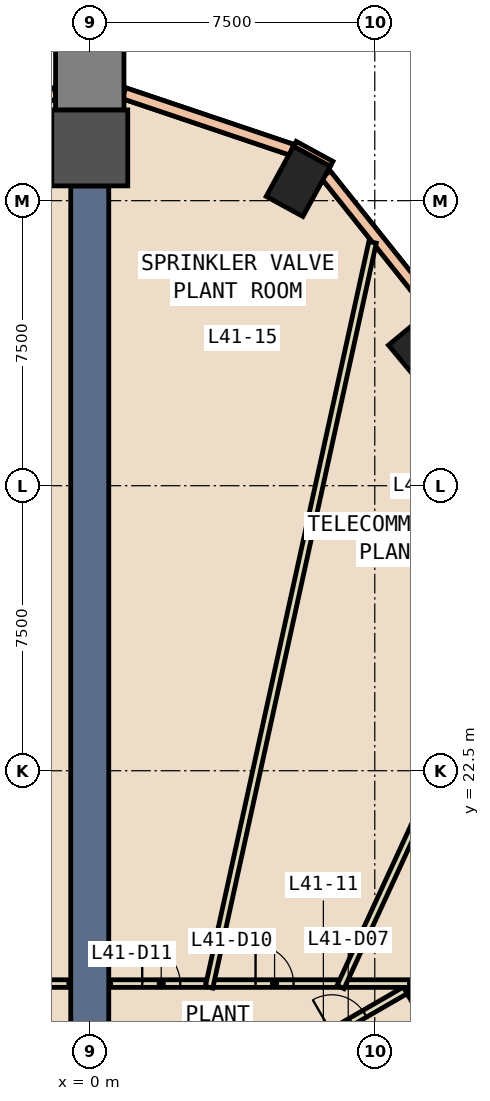
"""IFC4 building model, lengths in metres.
Left out: names, types, materials, properties, quantities, classifications, styles, units other than length and angle.
Written with IfcOpenShell. Run it as: python <this file> out.ifc"""

import sys

from ifc_helpers import new_model, si_unit, direction, frame, frame_2d, origin, origin_2d, place, context, subcontext, project, spatial, rectangle, extrude, element, fill, save


model = new_model("IFC4")
c1 = context("Model", 3, precision=1e-05, world=origin(), true_north=direction((0.0, 1.0)))
c2 = subcontext(c1, "Body", "Model", "MODEL_VIEW")
j1 = project(units=[si_unit("LENGTHUNIT", "METRE"), si_unit("PLANEANGLEUNIT", "RADIAN")], contexts=[c1])
p1 = place(None, origin())
s1 = spatial("IfcSite", under=j1, at=p1, CompositionType="ELEMENT")
p2 = place(p1, origin())
s2 = spatial("IfcBuilding", under=s1, at=p2, CompositionType="ELEMENT")
p3 = place(p2, frame((0.0, 0.0, 184.4)))
s3 = spatial("IfcBuildingStorey", under=s2, at=p3, CompositionType="ELEMENT", Elevation=184.4)
for number, where, z_axis, x_axis in (
    (1, (8.789, 33.754, -0.6), (0.0, 0.0, 1.0), (-0.639, 0.769, 0.0)),
    (2, (5.485, 38.006, -0.6), (0.0, 0.0, 1.0), (-0.878, 0.479, 0.0)),
):
    element("IfcColumn", number, at=place(p3, frame(where, z_axis=z_axis, x_axis=x_axis)), inside=s3, PredefinedType="COLUMN", context=c2, shape_type="SweptSolid", body=[
        extrude(rectangle(XDim=1.1, YDim=1.5, at=origin_2d()), origin(), (0.0, 0.0, 1.0), 5.4),
    ])
p4 = place(p3, frame((0.0, 38.889, -0.6), z_axis=(0.0, 0.0, 1.0), x_axis=(0.0, 1.0, 0.0)))
e3 = element("IfcColumn", 3, at=p4, inside=s3, PredefinedType="COLUMN", context=c2, shape_type="SweptSolid", body=[
    extrude(rectangle(XDim=2.0, YDim=2.0, at=origin_2d()), origin(), (0.0, 0.0, 1.0), 5.4),
])
p5 = place(p3, frame((0.0, 40.789, -0.6), z_axis=(0.0, 0.0, 1.0), x_axis=(0.0, 1.0, 0.0)))
e4 = element("IfcColumn", 4, at=p5, inside=s3, PredefinedType="COLUMN", context=c2, shape_type="SweptSolid", body=[
    extrude(rectangle(XDim=1.8, YDim=1.8, at=origin_2d()), origin(), (0.0, 0.0, 1.0), 5.4),
])
p6 = place(p3, frame((0.0, 14.5, 0.0), z_axis=(0.0, 0.0, 1.0), x_axis=(0.0, 1.0, 0.0)))
e5 = element("IfcWall", 5, at=p6, inside=s3, PredefinedType="SHEAR", context=c2, shape_type="SweptSolid", body=[
    extrude(rectangle(XDim=23.389, YDim=1.0, at=frame_2d((11.694, 0.0))), origin(), (0.0, 0.0, 1.0), 4.8),
])
p7 = place(p3, frame((6.363, 38.467, 0.0), z_axis=(0.0, 0.0, 1.0), x_axis=(-0.877929486755, 0.478789950068, 0.0)))
e6 = element("IfcWall", 6, at=p7, inside=s3, PredefinedType="STANDARD", context=c2, shape_type="SweptSolid", body=[
    extrude(rectangle(XDim=1.1, YDim=0.15, at=frame_2d((0.55, 0.0))), origin(), (0.0, 0.0, 1.0), 4.8),
])
p8 = place(p3, frame((9.023, 34.662, 0.0), z_axis=(0.0, 0.0, 1.0), x_axis=(-0.623651555058, 0.781702461218, 0.0)))
e7 = element("IfcWall", 7, at=p8, inside=s3, PredefinedType="STANDARD", context=c2, shape_type="SweptSolid", body=[
    extrude(rectangle(XDim=4.51, YDim=0.3, at=frame_2d((2.255, 0.0))), origin(), (0.0, 0.0, 1.0), 1.2),
])
p9 = place(p3, frame((9.023, 34.662, 4.0), z_axis=(0.0, 0.0, 1.0), x_axis=(-0.623651555058, 0.781702461218, 0.0)))
e8 = element("IfcWall", 8, at=p9, inside=s3, PredefinedType="STANDARD", context=c2, shape_type="SweptSolid", body=[
    extrude(rectangle(XDim=4.51, YDim=0.3, at=frame_2d((2.255, 0.0))), origin(), (0.0, 0.0, 1.0), 0.8),
])
p10 = place(p3, frame((5.315, 38.84, 0.0), z_axis=(0.0, 0.0, 1.0), x_axis=(-0.947661997786, 0.319275332514, 0.0)))
e9 = element("IfcWall", 9, at=p10, inside=s3, PredefinedType="STANDARD", context=c2, shape_type="SweptSolid", body=[
    extrude(rectangle(XDim=4.66, YDim=0.3, at=frame_2d((2.33, 0.0))), origin(), (0.0, 0.0, 1.0), 1.2),
])
p11 = place(p3, frame((5.315, 38.84, 4.0), z_axis=(0.0, 0.0, 1.0), x_axis=(-0.947661997786, 0.319275332514, 0.0)))
e10 = element("IfcWall", 10, at=p11, inside=s3, PredefinedType="STANDARD", context=c2, shape_type="SweptSolid", body=[
    extrude(rectangle(XDim=4.66, YDim=0.3, at=frame_2d((2.33, 0.0))), origin(), (0.0, 0.0, 1.0), 0.8),
])
p12 = place(p3, frame((-0.899, 40.328, 0.0), z_axis=(0.0, 0.0, 1.0), x_axis=(-0.947661997786, -0.319275332514, 0.0)))
e11 = element("IfcWall", 11, at=p12, inside=s3, PredefinedType="STANDARD", context=c2, shape_type="SweptSolid", body=[
    extrude(rectangle(XDim=4.66, YDim=0.3, at=frame_2d((2.33, 0.0))), origin(), (0.0, 0.0, 1.0), 1.2),
])
p13 = place(p3, frame((-0.899, 40.328, 4.0), z_axis=(0.0, 0.0, 1.0), x_axis=(-0.947661997786, -0.319275332514, 0.0)))
e12 = element("IfcWall", 12, at=p13, inside=s3, PredefinedType="STANDARD", context=c2, shape_type="SweptSolid", body=[
    extrude(rectangle(XDim=4.66, YDim=0.3, at=frame_2d((2.33, 0.0))), origin(), (0.0, 0.0, 1.0), 0.8),
])
p14 = place(p3, frame((6.223, 15.521, 0.0), z_axis=(0.0, 0.0, 1.0), x_axis=(0.866022959057, 0.500004234368, 0.0)))
e13 = element("IfcWall", 13, at=p14, inside=s3, PredefinedType="PARTITIONING", context=c2, shape_type="SweptSolid", body=[
    extrude(rectangle(XDim=2.5, YDim=0.2, at=frame_2d((1.25, 0.0))), origin(), (0.0, 0.0, 1.0), 4.8),
])
p15 = place(p14, frame((0.168, 0.0, 0.0)))
e14 = element("IfcOpeningElement", 14, at=p15, cuts=e13, PredefinedType="OPENING", context=c2, shape_type="SweptSolid", body=[
    extrude(rectangle(XDim=1.0, YDim=2.1, at=frame_2d((0.5, 1.05))), frame((0.0, 0.11, 0.0), z_axis=(0.0, -1.0, 0.0), x_axis=(1.0, 0.0, 0.0)), (0.0, 0.0, 1.0), 0.22),
])
p16 = place(p3, frame((8.398, 16.754, 0.0), z_axis=(0.0, 0.0, 1.0), x_axis=(0.500277597875, -0.865865073245, 0.0)))
e15 = element("IfcWall", 15, at=p16, inside=s3, PredefinedType="PARTITIONING", context=c2, shape_type="SweptSolid", body=[
    extrude(rectangle(XDim=0.114, YDim=0.2, at=frame_2d((0.057, 0.0))), origin(), (0.0, 0.0, 1.0), 4.8),
])
p17 = place(p3, frame((6.741, 16.9, 0.0), z_axis=(0.0, 0.0, 1.0), x_axis=(1.0, 0.0, 0.0)))
e16 = element("IfcWall", 16, at=p17, inside=s3, PredefinedType="PARTITIONING", context=c2, shape_type="SweptSolid", body=[
    extrude(rectangle(XDim=1.673, YDim=0.2, at=frame_2d((0.836, 0.0))), origin(), (0.0, 0.0, 1.0), 4.8),
])
p18 = place(p3, frame((3.26, 16.9, 0.0), z_axis=(0.0, 0.0, 1.0), x_axis=(1.0, 0.0, 0.0)))
e17 = element("IfcWall", 17, at=p18, inside=s3, PredefinedType="PARTITIONING", context=c2, shape_type="SweptSolid", body=[
    extrude(rectangle(XDim=3.281, YDim=0.2, at=frame_2d((1.641, 0.0))), origin(), (0.0, 0.0, 1.0), 4.8),
])
p19 = place(p18, frame((1.103, 0.0, 0.0)))
e18 = element("IfcOpeningElement", 18, at=p19, cuts=e17, PredefinedType="OPENING", context=c2, shape_type="SweptSolid", body=[
    extrude(rectangle(XDim=1.0, YDim=2.1, at=frame_2d((0.5, 1.05))), frame((0.0, 0.11, 0.0), z_axis=(0.0, -1.0, 0.0), x_axis=(1.0, 0.0, 0.0)), (0.0, 0.0, 1.0), 0.22),
])
p20 = place(p3, frame((0.55, 16.9, 0.0), z_axis=(0.0, 0.0, 1.0), x_axis=(1.0, 0.0, 0.0)))
e19 = element("IfcWall", 19, at=p20, inside=s3, PredefinedType="PARTITIONING", context=c2, shape_type="SweptSolid", body=[
    extrude(rectangle(XDim=2.51, YDim=0.2, at=frame_2d((1.255, 0.0))), origin(), (0.0, 0.0, 1.0), 4.8),
])
p21 = place(p20, frame((0.83, 0.0, 0.0)))
e20 = element("IfcOpeningElement", 20, at=p21, cuts=e19, PredefinedType="OPENING", context=c2, shape_type="SweptSolid", body=[
    extrude(rectangle(XDim=1.0, YDim=2.1, at=frame_2d((0.5, 1.05))), frame((0.0, 0.11, 0.0), z_axis=(0.0, -1.0, 0.0), x_axis=(1.0, 0.0, 0.0)), (0.0, 0.0, 1.0), 0.22),
])
p22 = place(p3, frame((6.599, 16.809, 0.0), z_axis=(0.0, 0.0, 1.0), x_axis=(0.418744831877, 0.908103939963, 0.0)))
e21 = element("IfcWall", 21, at=p22, inside=s3, PredefinedType="PARTITIONING", context=c2, shape_type="SweptSolid", body=[
    extrude(rectangle(XDim=12.353, YDim=0.2, at=frame_2d((6.177, 0.0))), origin(), (0.0, 0.0, 1.0), 4.8),
])
p23 = place(p3, frame((3.139, 16.802, 0.0), z_axis=(0.0, 0.0, 1.0), x_axis=(0.214411540921, 0.976743411096, 0.0)))
e22 = element("IfcWall", 22, at=p23, inside=s3, PredefinedType="PARTITIONING", context=c2, shape_type="SweptSolid", body=[
    extrude(rectangle(XDim=20.069, YDim=0.2, at=frame_2d((10.034, 0.0))), origin(), (0.0, 0.0, 1.0), 4.8),
])
p24 = place(p3, frame((0.0, 39.909, 0.0), z_axis=(0.0, 0.0, 1.0), x_axis=(0.0, 1.0, 0.0)))
e23 = element("IfcWall", 23, at=p24, inside=s3, PredefinedType="PARTITIONING", context=c2, shape_type="SweptSolid", body=[
    extrude(rectangle(XDim=0.5, YDim=0.2, at=frame_2d((0.25, 0.0))), origin(), (0.0, 0.0, 1.0), 4.8),
])
p25 = place(p3, frame((8.455, 16.655, 0.0), z_axis=(0.0, 0.0, 1.0), x_axis=(0.499968249168, -0.86604373436, 0.0)))
e24 = element("IfcWall", 24, at=p25, inside=s3, PredefinedType="PARTITIONING", context=c2, shape_type="SweptSolid", body=[
    extrude(rectangle(XDim=1.118, YDim=0.2, at=frame_2d((0.559, 0.0))), origin(), (0.0, 0.0, 1.0), 2.4),
])
p26 = place(p3, frame((-1.682, 16.9, 0.0), z_axis=(0.0, 0.0, 1.0), x_axis=(1.0, 0.0, 0.0)))
e25 = element("IfcWall", 25, at=p26, inside=s3, PredefinedType="PARTITIONING", context=c2, shape_type="SweptSolid", body=[
    extrude(rectangle(XDim=1.132, YDim=0.2, at=frame_2d((0.566, 0.0))), origin(), (0.0, 0.0, 1.0), 4.8),
])
p27 = place(p15, origin())
e26 = element("IfcDoor", 26, at=p27, inside=s3, OperationType="SINGLE_SWING_LEFT", PredefinedType="DOOR", context=c2, shape_type="SweptSolid", body=[
    extrude(rectangle(XDim=1.0, YDim=2.1, at=frame_2d((0.5, 1.05))), frame((0.0, 0.025, 0.0), z_axis=(0.0, -1.0, 0.0), x_axis=(1.0, 0.0, 0.0)), (0.0, 0.0, 1.0), 0.05),
])
fill(e14, e26)
p28 = place(p19, origin())
e27 = element("IfcDoor", 27, at=p28, inside=s3, OperationType="SINGLE_SWING_RIGHT", PredefinedType="DOOR", context=c2, shape_type="SweptSolid", body=[
    extrude(rectangle(XDim=1.0, YDim=2.1, at=frame_2d((0.5, 1.05))), frame((0.0, 0.025, 0.0), z_axis=(0.0, -1.0, 0.0), x_axis=(1.0, 0.0, 0.0)), (0.0, 0.0, 1.0), 0.05),
])
fill(e18, e27)
p29 = place(p21, origin())
e28 = element("IfcDoor", 28, at=p29, inside=s3, OperationType="SINGLE_SWING_LEFT", PredefinedType="DOOR", context=c2, shape_type="SweptSolid", body=[
    extrude(rectangle(XDim=1.0, YDim=2.1, at=frame_2d((0.5, 1.05))), frame((0.0, 0.025, 0.0), z_axis=(0.0, -1.0, 0.0), x_axis=(1.0, 0.0, 0.0)), (0.0, 0.0, 1.0), 0.05),
])
fill(e20, e28)
save(model, sys.argv[1])
